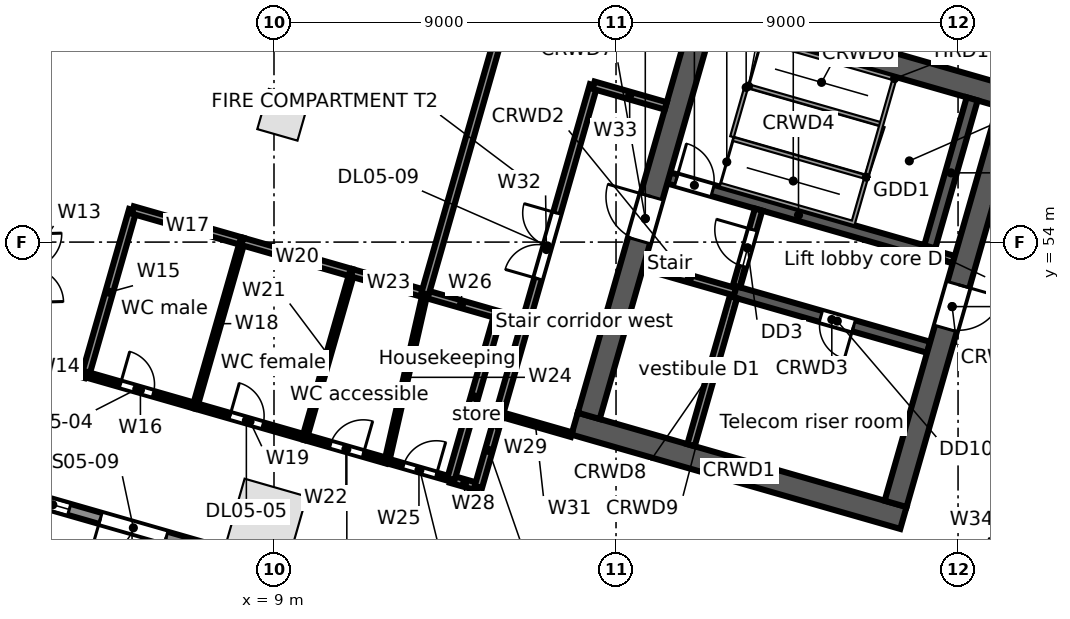
"""IFC4 building model, lengths in metres.
Left out: names, types, materials, properties, quantities, classifications, styles, units other than length and angle.
Written with IfcOpenShell. Run it as: python <this file> out.ifc"""

import sys

from ifc_helpers import new_model, si_unit, direction, frame, frame_2d, origin, origin_2d, place, context, subcontext, project, spatial, rectangle, extrude, element, fill, save


model = new_model("IFC4")
c1 = context("Model", 3, precision=1e-05, world=origin(), true_north=direction((0.0, 1.0)))
c2 = subcontext(c1, "Body", "Model", "MODEL_VIEW")
j1 = project(units=[si_unit("LENGTHUNIT", "METRE"), si_unit("PLANEANGLEUNIT", "RADIAN")], contexts=[c1])
p1 = place(None, origin())
s1 = spatial("IfcSite", under=j1, at=p1, CompositionType="ELEMENT")
p2 = place(p1, origin())
s2 = spatial("IfcBuilding", under=s1, at=p2, CompositionType="ELEMENT")
p3 = place(p2, frame((0.0, 0.0, 26.5)))
s3 = spatial("IfcBuildingStorey", under=s2, at=p3, CompositionType="ELEMENT", Elevation=26.5)
p4 = place(p3, frame((8.81, 46.722, 0.0), z_axis=(0.0, 0.0, 1.0), x_axis=(0.961261695938, -0.275637355817, 0.0)))
e1 = element("IfcColumn", 1, at=p4, inside=s3, PredefinedType="COLUMN", context=c2, shape_type="SweptSolid", body=[
    extrude(rectangle(XDim=1.7, YDim=1.7, at=origin_2d()), origin(), (0.0, 0.0, 1.0), 5.0),
])
p5 = place(p3, frame((9.241, 57.35, 0.0), z_axis=(0.0, 0.0, 1.0), x_axis=(0.961261695938, -0.275637355817, 0.0)))
e2 = element("IfcColumn", 2, at=p5, inside=s3, PredefinedType="COLUMN", context=c2, shape_type="SweptSolid", body=[
    extrude(rectangle(XDim=1.1, YDim=1.1, at=origin_2d()), origin(), (0.0, 0.0, 1.0), 5.0),
])
p6 = place(p3, frame((25.398, 40.717, 0.0), z_axis=(0.0, 0.0, 1.0), x_axis=(-0.961262423262, 0.275634819324, 0.0)))
e3 = element("IfcWall", 3, at=p6, inside=s3, PredefinedType="STANDARD", context=c2, shape_type="SweptSolid", body=[
    extrude(rectangle(XDim=26.359, YDim=0.3, at=frame_2d((13.179, 0.0))), origin(), (0.0, 0.0, 1.0), 4.68),
])
p7 = place(p6, frame((22.664, 0.0, 0.6)))
e4 = element("IfcOpeningElement", 4, at=p7, cuts=e3, PredefinedType="OPENING", context=c2, shape_type="SweptSolid", body=[
    extrude(rectangle(XDim=0.9, YDim=3.2, at=frame_2d((0.45, 1.6))), frame((0.0, 0.16, 0.0), z_axis=(0.0, -1.0, 0.0), x_axis=(1.0, 0.0, 0.0)), (0.0, 0.0, 1.0), 0.32),
])
p8 = place(p6, frame((20.009, 0.0, 0.0)))
e5 = element("IfcOpeningElement", 5, at=p8, cuts=e3, PredefinedType="OPENING", context=c2, shape_type="SweptSolid", body=[
    extrude(rectangle(XDim=1.8, YDim=2.4, at=frame_2d((0.9, 1.2))), frame((0.0, 0.16, 0.0), z_axis=(0.0, -1.0, 0.0), x_axis=(1.0, 0.0, 0.0)), (0.0, 0.0, 1.0), 0.32),
])
p9 = place(p6, frame((13.844, 0.0, 0.6)))
e6 = element("IfcOpeningElement", 6, at=p9, cuts=e3, PredefinedType="OPENING", context=c2, shape_type="SweptSolid", body=[
    extrude(rectangle(XDim=0.9, YDim=3.2, at=frame_2d((0.45, 1.6))), frame((0.0, 0.16, 0.0), z_axis=(0.0, -1.0, 0.0), x_axis=(1.0, 0.0, 0.0)), (0.0, 0.0, 1.0), 0.32),
])
p10 = place(p6, frame((11.188, 0.0, 0.0)))
e7 = element("IfcOpeningElement", 7, at=p10, cuts=e3, PredefinedType="OPENING", context=c2, shape_type="SweptSolid", body=[
    extrude(rectangle(XDim=1.8, YDim=2.4, at=frame_2d((0.9, 1.2))), frame((0.0, 0.16, 0.0), z_axis=(0.0, -1.0, 0.0), x_axis=(1.0, 0.0, 0.0)), (0.0, 0.0, 1.0), 0.32),
])
p11 = place(p6, frame((5.023, 0.0, 0.6)))
e8 = element("IfcOpeningElement", 8, at=p11, cuts=e3, PredefinedType="OPENING", context=c2, shape_type="SweptSolid", body=[
    extrude(rectangle(XDim=0.9, YDim=3.2, at=frame_2d((0.45, 1.6))), frame((0.0, 0.16, 0.0), z_axis=(0.0, -1.0, 0.0), x_axis=(1.0, 0.0, 0.0)), (0.0, 0.0, 1.0), 0.32),
])
p12 = place(p6, frame((2.368, 0.0, 0.0)))
e9 = element("IfcOpeningElement", 9, at=p12, cuts=e3, PredefinedType="OPENING", context=c2, shape_type="SweptSolid", body=[
    extrude(rectangle(XDim=1.8, YDim=2.4, at=frame_2d((0.9, 1.2))), frame((0.0, 0.16, 0.0), z_axis=(0.0, -1.0, 0.0), x_axis=(1.0, 0.0, 0.0)), (0.0, 0.0, 1.0), 0.32),
])
p13 = place(p3, frame((16.911, 49.221, 0.0), z_axis=(0.0, 0.0, 1.0), x_axis=(0.96126248289, -0.275634611374, 0.0)))
e10 = element("IfcWall", 10, at=p13, inside=s3, PredefinedType="SOLIDWALL", context=c2, shape_type="SweptSolid", body=[
    extrude(rectangle(XDim=9.0, YDim=0.6, at=frame_2d((4.5, 0.0))), origin(), (0.0, 0.0, 1.0), 4.68),
])
p14 = place(p3, frame((18.728, 53.382, 0.0), z_axis=(0.0, 0.0, 1.0), x_axis=(0.961247070632, -0.275688355216, 0.0)))
e11 = element("IfcWall", 11, at=p14, inside=s3, PredefinedType="SOLIDWALL", context=c2, shape_type="SweptSolid", body=[
    extrude(rectangle(XDim=2.5, YDim=0.2, at=frame_2d((1.25, 0.0))), origin(), (0.0, 0.0, 1.0), 4.68),
])
p15 = place(p3, frame((21.131, 52.692, 0.0), z_axis=(0.0, 0.0, 1.0), x_axis=(0.961271492568, -0.275603188616, 0.0)))
e12 = element("IfcWall", 12, at=p15, inside=s3, PredefinedType="SOLIDWALL", context=c2, shape_type="SweptSolid", body=[
    extrude(rectangle(XDim=5.3, YDim=0.3, at=frame_2d((2.65, 0.0))), origin(), (0.0, 0.0, 1.0), 4.68),
])
p16 = place(p15, frame((2.35, 0.0, 0.0)))
e13 = element("IfcOpeningElement", 13, at=p16, cuts=e12, PredefinedType="OPENING", context=c2, shape_type="SweptSolid", body=[
    extrude(rectangle(XDim=0.9, YDim=2.1, at=frame_2d((0.45, 1.05))), frame((0.0, 0.16, 0.0), z_axis=(0.0, -1.0, 0.0), x_axis=(1.0, 0.0, 0.0)), (0.0, 0.0, 1.0), 0.32),
])
p17 = place(p3, frame((19.389, 55.689, 0.0), z_axis=(0.0, 0.0, 1.0), x_axis=(0.961261397636, -0.275638396117, 0.0)))
e14 = element("IfcWall", 14, at=p17, inside=s3, PredefinedType="SOLIDWALL", context=c2, shape_type="SweptSolid", body=[
    extrude(rectangle(XDim=7.1, YDim=0.3, at=frame_2d((3.55, 0.0))), origin(), (0.0, 0.0, 1.0), 4.68),
])
p18 = place(p17, frame((0.2, 0.0, 0.0)))
e15 = element("IfcOpeningElement", 15, at=p18, cuts=e14, PredefinedType="OPENING", context=c2, shape_type="SweptSolid", body=[
    extrude(rectangle(XDim=1.0, YDim=2.1, at=frame_2d((0.5, 1.05))), frame((0.0, 0.16, 0.0), z_axis=(0.0, -1.0, 0.0), x_axis=(1.0, 0.0, 0.0)), (0.0, 0.0, 1.0), 0.32),
])
p19 = place(p3, frame((26.214, 53.732, 0.0), z_axis=(0.0, 0.0, 1.0), x_axis=(0.96122076476, -0.27578005982, 0.0)))
e16 = element("IfcWall", 16, at=p19, inside=s3, PredefinedType="SOLIDWALL", context=c2, shape_type="SweptSolid", body=[
    extrude(rectangle(XDim=0.7, YDim=0.2, at=frame_2d((0.35, 0.0))), origin(), (0.0, 0.0, 1.0), 4.68),
])
p20 = place(p3, frame((20.053, 60.18, 0.0), z_axis=(0.0, 0.0, 1.0), x_axis=(0.96126248289, -0.275634611374, 0.0)))
e17 = element("IfcWall", 17, at=p20, inside=s3, PredefinedType="SOLIDWALL", context=c2, shape_type="SweptSolid", body=[
    extrude(rectangle(XDim=9.0, YDim=0.6, at=frame_2d((4.5, 0.0))), origin(), (0.0, 0.0, 1.0), 4.68),
])
p21 = place(p3, frame((17.282, 49.427, 0.0), z_axis=(0.0, 0.0, 1.0), x_axis=(0.275631631629, 0.961263337304, 0.0)))
e18 = element("IfcWall", 18, at=p21, inside=s3, PredefinedType="SOLIDWALL", context=c2, shape_type="SweptSolid", body=[
    extrude(rectangle(XDim=10.8, YDim=0.6, at=frame_2d((5.4, 0.0))), origin(), (0.0, 0.0, 1.0), 4.68),
])
p22 = place(p21, frame((4.8, 0.0, 0.0)))
e19 = element("IfcOpeningElement", 19, at=p22, cuts=e18, PredefinedType="OPENING", context=c2, shape_type="SweptSolid", body=[
    extrude(rectangle(XDim=1.2, YDim=2.1, at=frame_2d((0.6, 1.05))), frame((0.0, 0.31, 0.0), z_axis=(0.0, -1.0, 0.0), x_axis=(1.0, 0.0, 0.0)), (0.0, 0.0, 1.0), 0.62),
])
p23 = place(p3, frame((19.973, 48.655, 0.0), z_axis=(0.0, 0.0, 1.0), x_axis=(0.275668441653, 0.961252781674, 0.0)))
e20 = element("IfcWall", 20, at=p23, inside=s3, PredefinedType="SOLIDWALL", context=c2, shape_type="SweptSolid", body=[
    extrude(rectangle(XDim=4.05, YDim=0.2, at=frame_2d((2.025, 0.0))), origin(), (0.0, 0.0, 1.0), 4.68),
])
p24 = place(p3, frame((21.172, 52.837, 0.0), z_axis=(0.0, 0.0, 1.0), x_axis=(0.275657676022, 0.961255868981, 0.0)))
e21 = element("IfcWall", 21, at=p24, inside=s3, PredefinedType="PARTITIONING", context=c2, shape_type="SweptSolid", body=[
    extrude(rectangle(XDim=2.1, YDim=0.2, at=frame_2d((1.05, 0.0))), origin(), (0.0, 0.0, 1.0), 4.68),
])
p25 = place(p24, frame((0.55, 0.0, 0.0)))
e22 = element("IfcOpeningElement", 22, at=p25, cuts=e21, PredefinedType="OPENING", context=c2, shape_type="SweptSolid", body=[
    extrude(rectangle(XDim=1.0, YDim=2.1, at=frame_2d((0.5, 1.05))), frame((0.0, 0.11, 0.0), z_axis=(0.0, -1.0, 0.0), x_axis=(1.0, 0.0, 0.0)), (0.0, 0.0, 1.0), 0.22),
])
p26 = place(p3, frame((26.256, 53.876, 0.0), z_axis=(0.0, 0.0, 1.0), x_axis=(0.275612739511, 0.961268754209, 0.0)))
e23 = element("IfcWall", 23, at=p26, inside=s3, PredefinedType="SOLIDWALL", context=c2, shape_type="SweptSolid", body=[
    extrude(rectangle(XDim=4.05, YDim=0.3, at=frame_2d((2.025, 0.0))), origin(), (0.0, 0.0, 1.0), 4.68),
])
p27 = place(p3, frame((25.356, 47.112, 0.0), z_axis=(0.0, 0.0, 1.0), x_axis=(0.275631631629, 0.961263337304, 0.0)))
e24 = element("IfcWall", 24, at=p27, inside=s3, PredefinedType="SOLIDWALL", context=c2, shape_type="SweptSolid", body=[
    extrude(rectangle(XDim=10.8, YDim=0.6, at=frame_2d((5.4, 0.0))), origin(), (0.0, 0.0, 1.0), 4.68),
])
p28 = place(p27, frame((4.8, 0.0, 0.0)))
e25 = element("IfcOpeningElement", 25, at=p28, cuts=e24, PredefinedType="OPENING", context=c2, shape_type="SweptSolid", body=[
    extrude(rectangle(XDim=1.2, YDim=2.1, at=frame_2d((0.6, 1.05))), frame((0.0, 0.31, 0.0), z_axis=(0.0, -1.0, 0.0), x_axis=(1.0, 0.0, 0.0)), (0.0, 0.0, 1.0), 0.62),
])
p29 = place(p3, frame((2.601, 50.932, 0.0), z_axis=(0.0, 0.0, 1.0), x_axis=(0.961197773994, -0.27586018065, 0.0)))
e26 = element("IfcWall", 26, at=p29, inside=s3, PredefinedType="PARTITIONING", context=c2, shape_type="SweptSolid", body=[
    extrude(rectangle(XDim=1.5, YDim=0.2, at=frame_2d((0.75, 0.0))), origin(), (0.0, 0.0, 1.0), 4.68),
])
p30 = place(p3, frame((4.043, 50.518, 0.0), z_axis=(0.0, 0.0, 1.0), x_axis=(0.275745553681, 0.96123066411, 0.0)))
e27 = element("IfcWall", 27, at=p30, inside=s3, PredefinedType="PARTITIONING", context=c2, shape_type="SweptSolid", body=[
    extrude(rectangle(XDim=4.5, YDim=0.2, at=frame_2d((2.25, 0.0))), origin(), (0.0, 0.0, 1.0), 4.68),
])
p31 = place(p3, frame((4.043, 50.518, 0.0), z_axis=(0.0, 0.0, 1.0), x_axis=(0.961247103494, -0.275688240636, 0.0)))
e28 = element("IfcWall", 28, at=p31, inside=s3, PredefinedType="PARTITIONING", context=c2, shape_type="SweptSolid", body=[
    extrude(rectangle(XDim=3.0, YDim=0.15, at=frame_2d((1.5, 0.0))), origin(), (0.0, 0.0, 1.0), 4.68),
])
p32 = place(p31, frame((0.95, 0.0, 0.0)))
e29 = element("IfcOpeningElement", 29, at=p32, cuts=e28, PredefinedType="OPENING", context=c2, shape_type="SweptSolid", body=[
    extrude(rectangle(XDim=0.9, YDim=2.1, at=frame_2d((0.45, 1.05))), frame((0.0, 0.085, 0.0), z_axis=(0.0, -1.0, 0.0), x_axis=(1.0, 0.0, 0.0)), (0.0, 0.0, 1.0), 0.17),
])
p33 = place(p3, frame((5.284, 54.844, 0.0), z_axis=(0.0, 0.0, 1.0), x_axis=(0.961243927922, -0.275699312717, 0.0)))
e30 = element("IfcWall", 30, at=p33, inside=s3, PredefinedType="PARTITIONING", context=c2, shape_type="SweptSolid", body=[
    extrude(rectangle(XDim=2.999, YDim=0.2, at=frame_2d((1.5, 0.0))), origin(), (0.0, 0.0, 1.0), 4.68),
])
p34 = place(p3, frame((6.927, 49.691, 0.0), z_axis=(0.0, 0.0, 1.0), x_axis=(0.275530671241, 0.961292280841, 0.0)))
e31 = element("IfcWall", 31, at=p34, inside=s3, PredefinedType="PARTITIONING", context=c2, shape_type="SweptSolid", body=[
    extrude(rectangle(XDim=4.5, YDim=0.125, at=frame_2d((2.25, 0.0))), origin(), (0.0, 0.0, 1.0), 4.68),
])
p35 = place(p3, frame((6.927, 49.691, 0.0), z_axis=(0.0, 0.0, 1.0), x_axis=(0.961268664977, -0.27561305073, 0.0)))
e32 = element("IfcWall", 32, at=p35, inside=s3, PredefinedType="PARTITIONING", context=c2, shape_type="SweptSolid", body=[
    extrude(rectangle(XDim=3.0, YDim=0.15, at=frame_2d((1.5, 0.0))), origin(), (0.0, 0.0, 1.0), 3.742),
])
p36 = place(p35, frame((0.95, 0.0, 0.0)))
e33 = element("IfcOpeningElement", 33, at=p36, cuts=e32, PredefinedType="OPENING", context=c2, shape_type="SweptSolid", body=[
    extrude(rectangle(XDim=0.9, YDim=2.1, at=frame_2d((0.45, 1.05))), frame((0.0, 0.085, 0.0), z_axis=(0.0, -1.0, 0.0), x_axis=(1.0, 0.0, 0.0)), (0.0, 0.0, 1.0), 0.17),
])
p37 = place(p3, frame((8.167, 54.017, 0.0), z_axis=(0.0, 0.0, 1.0), x_axis=(0.961247103494, -0.275688240636, 0.0)))
e34 = element("IfcWall", 34, at=p37, inside=s3, PredefinedType="PARTITIONING", context=c2, shape_type="SweptSolid", body=[
    extrude(rectangle(XDim=3.0, YDim=0.2, at=frame_2d((1.5, 0.0))), origin(), (0.0, 0.0, 1.0), 3.742),
])
p38 = place(p3, frame((9.811, 48.864, 0.0), z_axis=(0.0, 0.0, 1.0), x_axis=(0.275545040649, 0.96128816209, 0.0)))
e35 = element("IfcWall", 35, at=p38, inside=s3, PredefinedType="PARTITIONING", context=c2, shape_type="SweptSolid", body=[
    extrude(rectangle(XDim=4.5, YDim=0.125, at=frame_2d((2.25, 0.0))), origin(), (0.0, 0.0, 1.0), 4.68),
])
p39 = place(p3, frame((9.811, 48.864, 0.0), z_axis=(0.0, 0.0, 1.0), x_axis=(0.961236680145, -0.275724581318, 0.0)))
e36 = element("IfcWall", 36, at=p39, inside=s3, PredefinedType="PARTITIONING", context=c2, shape_type="SweptSolid", body=[
    extrude(rectangle(XDim=2.249, YDim=0.15, at=frame_2d((1.125, 0.0))), origin(), (0.0, 0.0, 1.0), 4.68),
])
p40 = place(p39, frame((0.7, 0.0, 0.0)))
e37 = element("IfcOpeningElement", 37, at=p40, cuts=e36, PredefinedType="OPENING", context=c2, shape_type="SweptSolid", body=[
    extrude(rectangle(XDim=0.9, YDim=2.1, at=frame_2d((0.45, 1.05))), frame((0.0, 0.085, 0.0), z_axis=(0.0, -1.0, 0.0), x_axis=(1.0, 0.0, 0.0)), (0.0, 0.0, 1.0), 0.17),
])
p41 = place(p3, frame((11.051, 53.19, 0.0), z_axis=(0.0, 0.0, 1.0), x_axis=(0.961316434736, -0.275446387355, 0.0)))
e38 = element("IfcWall", 38, at=p41, inside=s3, PredefinedType="PARTITIONING", context=c2, shape_type="SweptSolid", body=[
    extrude(rectangle(XDim=2.0, YDim=0.2, at=frame_2d((1.0, 0.0))), origin(), (0.0, 0.0, 1.0), 4.68),
])
p42 = place(p3, frame((11.973, 48.244, 0.0), z_axis=(0.0, 0.0, 1.0), x_axis=(0.222117362571, 0.975019936845, 0.0)))
e39 = element("IfcWall", 39, at=p42, inside=s3, PredefinedType="PARTITIONING", context=c2, shape_type="SweptSolid", body=[
    extrude(rectangle(XDim=4.508, YDim=0.125, at=frame_2d((2.254, 0.0))), origin(), (0.0, 0.0, 1.0), 4.68),
])
p43 = place(p3, frame((11.973, 48.244, 0.0), z_axis=(0.0, 0.0, 1.0), x_axis=(0.96136592135, -0.275273618907, 0.0)))
e40 = element("IfcWall", 40, at=p43, inside=s3, PredefinedType="PARTITIONING", context=c2, shape_type="SweptSolid", body=[
    extrude(rectangle(XDim=1.751, YDim=0.125, at=frame_2d((0.875, 0.0))), origin(), (0.0, 0.0, 1.0), 4.68),
])
p44 = place(p43, frame((0.45, 0.0, 0.0)))
e41 = element("IfcOpeningElement", 41, at=p44, cuts=e40, PredefinedType="OPENING", context=c2, shape_type="SweptSolid", body=[
    extrude(rectangle(XDim=0.9, YDim=2.1, at=frame_2d((0.45, 1.05))), frame((0.0, 0.073, 0.0), z_axis=(0.0, -1.0, 0.0), x_axis=(1.0, 0.0, 0.0)), (0.0, 0.0, 1.0), 0.145),
])
p45 = place(p3, frame((12.974, 52.639, 0.0), z_axis=(0.0, 0.0, 1.0), x_axis=(0.961270097305, -0.275608055084, 0.0)))
e42 = element("IfcWall", 42, at=p45, inside=s3, PredefinedType="PARTITIONING", context=c2, shape_type="SweptSolid", body=[
    extrude(rectangle(XDim=1.999, YDim=0.2, at=frame_2d((1.0, 0.0))), origin(), (0.0, 0.0, 1.0), 4.68),
])
p46 = place(p3, frame((12.974, 52.639, 0.0), z_axis=(0.0, 0.0, 1.0), x_axis=(0.275299463768, 0.961358520662, 0.0)))
e43 = element("IfcWall", 43, at=p46, inside=s3, PredefinedType="PARTITIONING", context=c2, shape_type="SweptSolid", body=[
    extrude(rectangle(XDim=14.885, YDim=0.2, at=frame_2d((7.443, 0.0))), origin(), (0.0, 0.0, 1.0), 3.742),
])
p47 = place(p3, frame((13.656, 47.762, 0.0), z_axis=(0.0, 0.0, 1.0), x_axis=(0.961154610169, -0.276010534854, 0.0)))
e44 = element("IfcWall", 44, at=p47, inside=s3, PredefinedType="PARTITIONING", context=c2, shape_type="SweptSolid", body=[
    extrude(rectangle(XDim=0.75, YDim=0.2, at=frame_2d((0.375, 0.0))), origin(), (0.0, 0.0, 1.0), 4.68),
])
p48 = place(p3, frame((13.656, 47.762, 0.0), z_axis=(0.0, 0.0, 1.0), x_axis=(0.275545040649, 0.96128816209, 0.0)))
e45 = element("IfcWall", 45, at=p48, inside=s3, PredefinedType="PARTITIONING", context=c2, shape_type="SweptSolid", body=[
    extrude(rectangle(XDim=4.5, YDim=0.2, at=frame_2d((2.25, 0.0))), origin(), (0.0, 0.0, 1.0), 4.68),
])
p49 = place(p3, frame((14.377, 47.555, 0.0), z_axis=(0.0, 0.0, 1.0), x_axis=(0.275446387355, 0.961316434736, 0.0)))
e46 = element("IfcWall", 46, at=p49, inside=s3, PredefinedType="PARTITIONING", context=c2, shape_type="SweptSolid", body=[
    extrude(rectangle(XDim=2.0, YDim=0.2, at=frame_2d((1.0, 0.0))), origin(), (0.0, 0.0, 1.0), 4.68),
])
p50 = place(p3, frame((14.928, 49.478, 0.0), z_axis=(0.0, 0.0, 1.0), x_axis=(0.961243778232, -0.27569983462, 0.0)))
e47 = element("IfcWall", 47, at=p50, inside=s3, PredefinedType="PARTITIONING", context=c2, shape_type="SweptSolid", body=[
    extrude(rectangle(XDim=1.977, YDim=0.125, at=frame_2d((0.988, 0.0))), origin(), (0.0, 0.0, 1.0), 4.68),
])
p51 = place(p3, frame((14.928, 49.478, 0.0), z_axis=(0.0, 0.0, 1.0), x_axis=(0.275674053528, 0.961251172281, 0.0)))
e48 = element("IfcWall", 48, at=p51, inside=s3, PredefinedType="PARTITIONING", context=c2, shape_type="SweptSolid", body=[
    extrude(rectangle(XDim=9.0, YDim=0.2, at=frame_2d((4.5, 0.0))), origin(), (0.0, 0.0, 1.0), 3.742),
])
p52 = place(p51, frame((3.7, 0.0, 0.0)))
e49 = element("IfcOpeningElement", 49, at=p52, cuts=e48, PredefinedType="OPENING", context=c2, shape_type="SweptSolid", body=[
    extrude(rectangle(XDim=1.8, YDim=2.1, at=frame_2d((0.9, 1.05))), frame((0.0, 0.11, 0.0), z_axis=(0.0, -1.0, 0.0), x_axis=(1.0, 0.0, 0.0)), (0.0, 0.0, 1.0), 0.22),
])
p53 = place(p3, frame((17.409, 58.129, 0.0), z_axis=(0.0, 0.0, 1.0), x_axis=(0.961253165474, -0.275667103345, 0.0)))
e50 = element("IfcWall", 50, at=p53, inside=s3, PredefinedType="PARTITIONING", context=c2, shape_type="SweptSolid", body=[
    extrude(rectangle(XDim=1.977, YDim=0.2, at=frame_2d((0.988, 0.0))), origin(), (0.0, 0.0, 1.0), 4.68),
])
p54 = place(p3, frame((26.456, 42.338, 0.0), z_axis=(0.0, 0.0, 1.0), x_axis=(0.52980027265, 0.848122438743, 0.0)))
e51 = element("IfcWall", 51, at=p54, inside=s3, PredefinedType="PARTITIONING", context=c2, shape_type="SweptSolid", body=[
    extrude(rectangle(XDim=6.076, YDim=0.25, at=frame_2d((3.038, 0.0))), origin(), (0.0, 0.0, 1.0), 4.68),
])
p55 = place(p54, frame((2.2, 0.0, 0.0)))
e52 = element("IfcOpeningElement", 52, at=p55, cuts=e51, PredefinedType="OPENING", context=c2, shape_type="SweptSolid", body=[
    extrude(rectangle(XDim=1.8, YDim=2.1, at=frame_2d((0.9, 1.05))), frame((0.0, 0.135, 0.0), z_axis=(0.0, -1.0, 0.0), x_axis=(1.0, 0.0, 0.0)), (0.0, 0.0, 1.0), 0.27),
])
p56 = place(p7, origin())
e53 = element("IfcWindow", 53, at=p56, inside=s3, PartitioningType="SINGLE_PANEL", PredefinedType="WINDOW", context=c2, shape_type="SweptSolid", body=[
    extrude(rectangle(XDim=0.9, YDim=3.2, at=frame_2d((0.45, 1.6))), frame((0.0, 0.03, 0.0), z_axis=(0.0, -1.0, 0.0), x_axis=(1.0, 0.0, 0.0)), (0.0, 0.0, 1.0), 0.06),
])
fill(e4, e53)
p57 = place(p8, origin())
e54 = element("IfcDoor", 54, at=p57, inside=s3, OperationType="DOUBLE_DOOR_SINGLE_SWING", PredefinedType="DOOR", context=c2, shape_type="SweptSolid", body=[
    extrude(rectangle(XDim=1.8, YDim=2.4, at=frame_2d((0.9, 1.2))), frame((0.0, 0.025, 0.0), z_axis=(0.0, -1.0, 0.0), x_axis=(1.0, 0.0, 0.0)), (0.0, 0.0, 1.0), 0.05),
])
fill(e5, e54)
p58 = place(p18, origin())
e55 = element("IfcDoor", 55, at=p58, inside=s3, OperationType="SINGLE_SWING_LEFT", PredefinedType="DOOR", context=c2, shape_type="SweptSolid", body=[
    extrude(rectangle(XDim=1.0, YDim=2.1, at=frame_2d((0.5, 1.05))), frame((0.0, 0.025, 0.0), z_axis=(0.0, -1.0, 0.0), x_axis=(1.0, 0.0, 0.0)), (0.0, 0.0, 1.0), 0.05),
])
fill(e15, e55)
p59 = place(p25, origin())
e56 = element("IfcDoor", 56, at=p59, inside=s3, OperationType="SINGLE_SWING_RIGHT", PredefinedType="DOOR", context=c2, shape_type="SweptSolid", body=[
    extrude(rectangle(XDim=1.0, YDim=2.1, at=frame_2d((0.5, 1.05))), frame((0.0, 0.025, 0.0), z_axis=(0.0, -1.0, 0.0), x_axis=(1.0, 0.0, 0.0)), (0.0, 0.0, 1.0), 0.05),
])
fill(e22, e56)
p60 = place(p22, origin())
e57 = element("IfcDoor", 57, at=p60, inside=s3, OperationType="SINGLE_SWING_RIGHT", PredefinedType="DOOR", context=c2, shape_type="SweptSolid", body=[
    extrude(rectangle(XDim=1.2, YDim=2.1, at=frame_2d((0.6, 1.05))), frame((0.0, 0.025, 0.0), z_axis=(0.0, -1.0, 0.0), x_axis=(1.0, 0.0, 0.0)), (0.0, 0.0, 1.0), 0.05),
])
fill(e19, e57)
p61 = place(p28, frame((1.2, 0.0, 0.0), z_axis=(0.0, 0.0, 1.0), x_axis=(-1.0, 0.0, 0.0)))
e58 = element("IfcDoor", 58, at=p61, inside=s3, OperationType="SINGLE_SWING_LEFT", PredefinedType="DOOR", context=c2, shape_type="SweptSolid", body=[
    extrude(rectangle(XDim=1.2, YDim=2.1, at=frame_2d((0.6, 1.05))), frame((0.0, 0.025, 0.0), z_axis=(0.0, -1.0, 0.0), x_axis=(1.0, 0.0, 0.0)), (0.0, 0.0, 1.0), 0.05),
])
fill(e25, e58)
p62 = place(p16, frame((0.9, 0.0, 0.0), z_axis=(0.0, 0.0, 1.0), x_axis=(-1.0, 0.0, 0.0)))
e59 = element("IfcDoor", 59, at=p62, inside=s3, OperationType="SINGLE_SWING_LEFT", PredefinedType="DOOR", context=c2, shape_type="SweptSolid", body=[
    extrude(rectangle(XDim=0.9, YDim=2.1, at=frame_2d((0.45, 1.05))), frame((0.0, 0.025, 0.0), z_axis=(0.0, -1.0, 0.0), x_axis=(1.0, 0.0, 0.0)), (0.0, 0.0, 1.0), 0.05),
])
fill(e13, e59)
p63 = place(p32, origin())
e60 = element("IfcDoor", 60, at=p63, inside=s3, OperationType="SINGLE_SWING_LEFT", PredefinedType="DOOR", context=c2, shape_type="SweptSolid", body=[
    extrude(rectangle(XDim=0.9, YDim=2.1, at=frame_2d((0.45, 1.05))), frame((0.0, 0.025, 0.0), z_axis=(0.0, -1.0, 0.0), x_axis=(1.0, 0.0, 0.0)), (0.0, 0.0, 1.0), 0.05),
])
fill(e29, e60)
p64 = place(p36, origin())
e61 = element("IfcDoor", 61, at=p64, inside=s3, OperationType="SINGLE_SWING_LEFT", PredefinedType="DOOR", context=c2, shape_type="SweptSolid", body=[
    extrude(rectangle(XDim=0.9, YDim=2.1, at=frame_2d((0.45, 1.05))), frame((0.0, 0.025, 0.0), z_axis=(0.0, -1.0, 0.0), x_axis=(1.0, 0.0, 0.0)), (0.0, 0.0, 1.0), 0.05),
])
fill(e33, e61)
p65 = place(p40, origin())
e62 = element("IfcDoor", 62, at=p65, inside=s3, OperationType="SINGLE_SWING_RIGHT", PredefinedType="DOOR", context=c2, shape_type="SweptSolid", body=[
    extrude(rectangle(XDim=0.9, YDim=2.1, at=frame_2d((0.45, 1.05))), frame((0.0, 0.025, 0.0), z_axis=(0.0, -1.0, 0.0), x_axis=(1.0, 0.0, 0.0)), (0.0, 0.0, 1.0), 0.05),
])
fill(e37, e62)
p66 = place(p44, origin())
e63 = element("IfcDoor", 63, at=p66, inside=s3, OperationType="SINGLE_SWING_RIGHT", PredefinedType="DOOR", context=c2, shape_type="SweptSolid", body=[
    extrude(rectangle(XDim=0.9, YDim=2.1, at=frame_2d((0.45, 1.05))), frame((0.0, 0.025, 0.0), z_axis=(0.0, -1.0, 0.0), x_axis=(1.0, 0.0, 0.0)), (0.0, 0.0, 1.0), 0.05),
])
fill(e41, e63)
p67 = place(p52, origin())
e64 = element("IfcDoor", 64, at=p67, inside=s3, OperationType="DOUBLE_DOOR_SINGLE_SWING", PredefinedType="DOOR", context=c2, shape_type="SweptSolid", body=[
    extrude(rectangle(XDim=1.8, YDim=2.1, at=frame_2d((0.9, 1.05))), frame((0.0, 0.025, 0.0), z_axis=(0.0, -1.0, 0.0), x_axis=(1.0, 0.0, 0.0)), (0.0, 0.0, 1.0), 0.05),
])
fill(e49, e64)
save(model, sys.argv[1])
